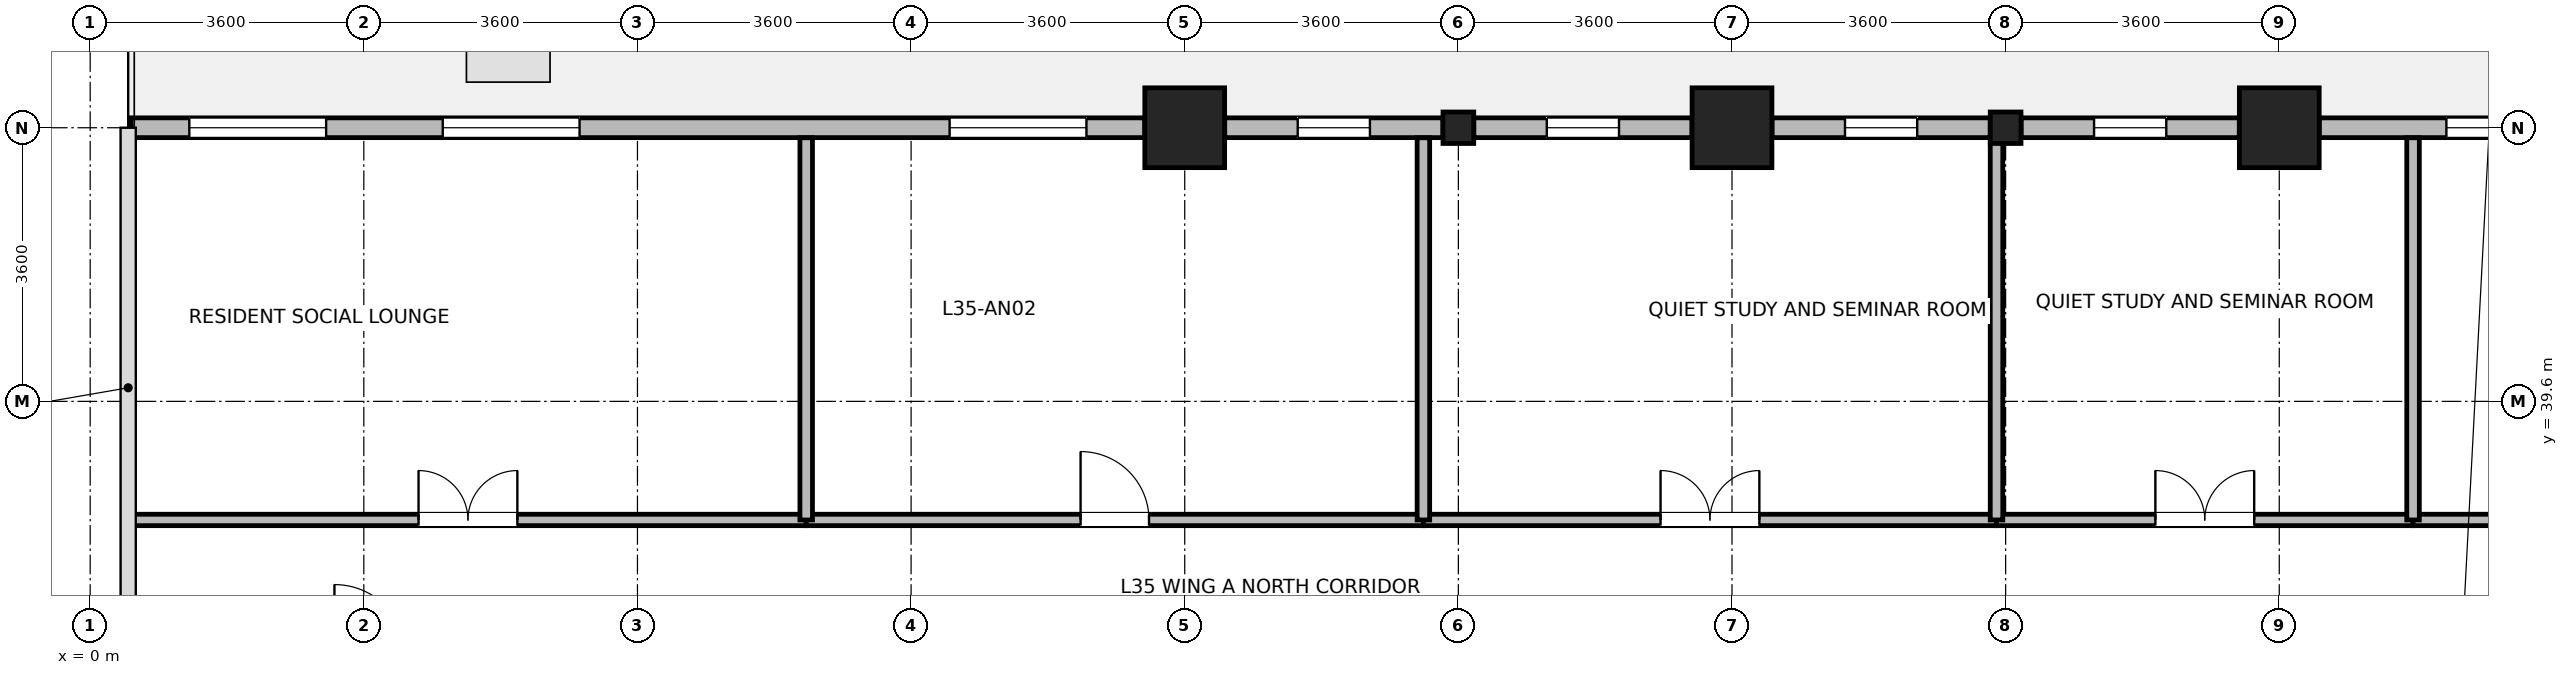
"""IFC4 building model, lengths in metres.
Left out: names, types, materials, properties, quantities, classifications, styles, units other than length and angle.
Written with IfcOpenShell. Run it as: python <this file> out.ifc"""

import sys

from ifc_helpers import new_model, si_unit, direction, frame, frame_2d, origin, origin_2d, place, context, subcontext, project, spatial, rectangle, i_section, extrude, source, transform, mapped, element, fill, save


model = new_model("IFC4")
c1 = context("Model", 3, precision=1e-05, world=origin(), true_north=direction((0.0, 1.0)))
c2 = subcontext(c1, "Body", "Model", "MODEL_VIEW")
j1 = project(units=[si_unit("LENGTHUNIT", "METRE"), si_unit("PLANEANGLEUNIT", "RADIAN")], contexts=[c1])
p1 = place(None, origin())
s1 = spatial("IfcSite", under=j1, at=p1, CompositionType="ELEMENT")
p2 = place(p1, origin())
s2 = spatial("IfcBuilding", under=s1, at=p2, CompositionType="ELEMENT")
p3 = place(p2, frame((0.0, 0.0, 140.2)))
s3 = spatial("IfcBuildingStorey", under=s2, at=p3, CompositionType="ELEMENT", Elevation=140.2)
m1 = source(origin(), c2, "Body", "SweptSolid", [
    extrude(rectangle(XDim=1.05, YDim=1.05, at=origin_2d()), origin(), (0.0, 0.0, 1.0), 3.7),
])
for number, where, z_axis, x_axis in (
    (1, (14.4, 43.2, 0.0), (0.0, 0.0, 1.0), (1.0, 0.0, 0.0)),
    (2, (21.6, 43.2, 0.0), (0.0, 0.0, 1.0), (1.0, 0.0, 0.0)),
    (3, (28.8, 43.2, 0.0), (0.0, 0.0, 1.0), (1.0, 0.0, 0.0)),
):
    element("IfcColumn", number, at=place(p3, frame(where, z_axis=z_axis, x_axis=x_axis)), inside=s3, PredefinedType="COLUMN", context=c2, shape_type="MappedRepresentation", body=[
        mapped(m1, transform((0.0, 0.0, 0.0), x_axis=(1.0, 0.0, 0.0), y_axis=(0.0, 1.0, 0.0), z_axis=(0.0, 0.0, 1.0), scale=1.0)),
    ])
m2 = source(origin(), c2, "Body", "SweptSolid", [
    extrude(i_section(OverallWidth=0.404, OverallDepth=0.414, WebThickness=0.021, FlangeThickness=0.028, FilletRadius=0.015, at=origin_2d()), origin(), (0.0, 0.0, 1.0), 3.7),
])
for number, where, z_axis, x_axis in (
    (4, (18.0, 43.2, 0.0), (0.0, 0.0, 1.0), (1.0, 0.0, 0.0)),
    (5, (25.2, 43.2, 0.0), (0.0, 0.0, 1.0), (1.0, 0.0, 0.0)),
):
    element("IfcColumn", number, at=place(p3, frame(where, z_axis=z_axis, x_axis=x_axis)), inside=s3, PredefinedType="COLUMN", context=c2, shape_type="MappedRepresentation", body=[
        mapped(m2, transform((0.0, 0.0, 0.0), x_axis=(1.0, 0.0, 0.0), y_axis=(0.0, 1.0, 0.0), z_axis=(0.0, 0.0, 1.0), scale=1.0)),
    ])
p4 = place(p3, frame((29.326, 43.2, 0.0), z_axis=(0.0, 0.0, 1.0), x_axis=(1.0, 0.0, 0.0)))
e6 = element("IfcWall", 6, at=p4, inside=s3, PredefinedType="STANDARD", context=c2, shape_type="SweptSolid", body=[
    extrude(rectangle(XDim=2.871, YDim=0.26, at=frame_2d((1.436, 0.0))), origin(), (0.0, 0.0, 1.0), 2.99),
])
p5 = place(p4, frame((1.673, 0.0, 0.85)))
e7 = element("IfcOpeningElement", 7, at=p5, cuts=e6, PredefinedType="OPENING", context=c2, shape_type="SweptSolid", body=[
    extrude(rectangle(XDim=0.95, YDim=1.75, at=frame_2d((0.475, 0.875))), frame((0.0, 0.14, 0.0), z_axis=(0.0, -1.0, 0.0), x_axis=(1.0, 0.0, 0.0)), (0.0, 0.0, 1.0), 0.28),
])
p6 = place(p3, frame((25.403, 43.2, 0.0), z_axis=(0.0, 0.0, 1.0), x_axis=(1.0, 0.0, 0.0)))
e8 = element("IfcWall", 8, at=p6, inside=s3, PredefinedType="STANDARD", context=c2, shape_type="SweptSolid", body=[
    extrude(rectangle(XDim=2.871, YDim=0.26, at=frame_2d((1.436, 0.0))), origin(), (0.0, 0.0, 1.0), 2.99),
])
p7 = place(p6, frame((0.96, 0.0, 0.85)))
e9 = element("IfcOpeningElement", 9, at=p7, cuts=e8, PredefinedType="OPENING", context=c2, shape_type="SweptSolid", body=[
    extrude(rectangle(XDim=0.95, YDim=1.75, at=frame_2d((0.475, 0.875))), frame((0.0, 0.14, 0.0), z_axis=(0.0, -1.0, 0.0), x_axis=(1.0, 0.0, 0.0)), (0.0, 0.0, 1.0), 0.28),
])
p8 = place(p3, frame((22.126, 43.2, 0.0), z_axis=(0.0, 0.0, 1.0), x_axis=(1.0, 0.0, 0.0)))
e10 = element("IfcWall", 10, at=p8, inside=s3, PredefinedType="STANDARD", context=c2, shape_type="SweptSolid", body=[
    extrude(rectangle(XDim=2.871, YDim=0.26, at=frame_2d((1.436, 0.0))), origin(), (0.0, 0.0, 1.0), 2.99),
])
p9 = place(p8, frame((0.96, 0.0, 0.85)))
e11 = element("IfcOpeningElement", 11, at=p9, cuts=e10, PredefinedType="OPENING", context=c2, shape_type="SweptSolid", body=[
    extrude(rectangle(XDim=0.95, YDim=1.75, at=frame_2d((0.475, 0.875))), frame((0.0, 0.14, 0.0), z_axis=(0.0, -1.0, 0.0), x_axis=(1.0, 0.0, 0.0)), (0.0, 0.0, 1.0), 0.28),
])
p10 = place(p3, frame((18.203, 43.2, 0.0), z_axis=(0.0, 0.0, 1.0), x_axis=(1.0, 0.0, 0.0)))
e12 = element("IfcWall", 12, at=p10, inside=s3, PredefinedType="STANDARD", context=c2, shape_type="SweptSolid", body=[
    extrude(rectangle(XDim=2.871, YDim=0.26, at=frame_2d((1.436, 0.0))), origin(), (0.0, 0.0, 1.0), 2.99),
])
p11 = place(p10, frame((0.96, 0.0, 0.85)))
e13 = element("IfcOpeningElement", 13, at=p11, cuts=e12, PredefinedType="OPENING", context=c2, shape_type="SweptSolid", body=[
    extrude(rectangle(XDim=0.95, YDim=1.75, at=frame_2d((0.475, 0.875))), frame((0.0, 0.14, 0.0), z_axis=(0.0, -1.0, 0.0), x_axis=(1.0, 0.0, 0.0)), (0.0, 0.0, 1.0), 0.28),
])
p12 = place(p3, frame((14.926, 43.2, 0.0), z_axis=(0.0, 0.0, 1.0), x_axis=(1.0, 0.0, 0.0)))
e14 = element("IfcWall", 14, at=p12, inside=s3, PredefinedType="STANDARD", context=c2, shape_type="SweptSolid", body=[
    extrude(rectangle(XDim=2.871, YDim=0.26, at=frame_2d((1.436, 0.0))), origin(), (0.0, 0.0, 1.0), 2.99),
])
p13 = place(p12, frame((0.96, 0.0, 0.85)))
e15 = element("IfcOpeningElement", 15, at=p13, cuts=e14, PredefinedType="OPENING", context=c2, shape_type="SweptSolid", body=[
    extrude(rectangle(XDim=0.95, YDim=1.75, at=frame_2d((0.475, 0.875))), frame((0.0, 0.14, 0.0), z_axis=(0.0, -1.0, 0.0), x_axis=(1.0, 0.0, 0.0)), (0.0, 0.0, 1.0), 0.28),
])
p14 = place(p3, frame((0.537, 43.2, 0.0), z_axis=(0.0, 0.0, 1.0), x_axis=(1.0, 0.0, 0.0)))
e16 = element("IfcWall", 16, at=p14, inside=s3, PredefinedType="STANDARD", context=c2, shape_type="SweptSolid", body=[
    extrude(rectangle(XDim=13.337, YDim=0.26, at=frame_2d((6.668, 0.0))), origin(), (0.0, 0.0, 1.0), 3.44),
])
p15 = place(p14, frame((0.767, 0.0, 0.85)))
e17 = element("IfcOpeningElement", 17, at=p15, cuts=e16, PredefinedType="OPENING", context=c2, shape_type="SweptSolid", body=[
    extrude(rectangle(XDim=1.8, YDim=1.85, at=frame_2d((0.9, 0.925))), frame((0.0, 0.14, 0.0), z_axis=(0.0, -1.0, 0.0), x_axis=(1.0, 0.0, 0.0)), (0.0, 0.0, 1.0), 0.28),
])
p16 = place(p14, frame((4.101, 0.0, 0.85)))
e18 = element("IfcOpeningElement", 18, at=p16, cuts=e16, PredefinedType="OPENING", context=c2, shape_type="SweptSolid", body=[
    extrude(rectangle(XDim=1.8, YDim=1.85, at=frame_2d((0.9, 0.925))), frame((0.0, 0.14, 0.0), z_axis=(0.0, -1.0, 0.0), x_axis=(1.0, 0.0, 0.0)), (0.0, 0.0, 1.0), 0.28),
])
p17 = place(p14, frame((10.77, 0.0, 0.85)))
e19 = element("IfcOpeningElement", 19, at=p17, cuts=e16, PredefinedType="OPENING", context=c2, shape_type="SweptSolid", body=[
    extrude(rectangle(XDim=1.8, YDim=1.85, at=frame_2d((0.9, 0.925))), frame((0.0, 0.14, 0.0), z_axis=(0.0, -1.0, 0.0), x_axis=(1.0, 0.0, 0.0)), (0.0, 0.0, 1.0), 0.28),
])
p18 = place(p3, frame((0.52, 38.04, 0.0), z_axis=(0.0, 0.0, 1.0), x_axis=(1.0, 0.0, 0.0)))
e20 = element("IfcWall", 20, at=p18, inside=s3, PredefinedType="PARTITIONING", context=c2, shape_type="SweptSolid", body=[
    extrude(rectangle(XDim=8.9, YDim=0.15, at=frame_2d((4.45, 0.0))), origin(), (0.0, 0.0, 1.0), 3.44),
])
p19 = place(p18, frame((3.8, 0.0, 0.0)))
e21 = element("IfcOpeningElement", 21, at=p19, cuts=e20, PredefinedType="OPENING", context=c2, shape_type="SweptSolid", body=[
    extrude(rectangle(XDim=1.3, YDim=2.12, at=frame_2d((0.65, 1.06))), frame((0.0, 0.085, 0.0), z_axis=(0.0, -1.0, 0.0), x_axis=(1.0, 0.0, 0.0)), (0.0, 0.0, 1.0), 0.17),
])
p20 = place(p3, frame((9.42, 38.04, 0.0), z_axis=(0.0, 0.0, 1.0), x_axis=(1.0, 0.0, 0.0)))
e22 = element("IfcWall", 22, at=p20, inside=s3, PredefinedType="PARTITIONING", context=c2, shape_type="SweptSolid", body=[
    extrude(rectangle(XDim=8.12, YDim=0.15, at=frame_2d((4.06, 0.0))), origin(), (0.0, 0.0, 1.0), 3.44),
])
p21 = place(p20, frame((3.61, 0.0, 0.0)))
e23 = element("IfcOpeningElement", 23, at=p21, cuts=e22, PredefinedType="OPENING", context=c2, shape_type="SweptSolid", body=[
    extrude(rectangle(XDim=0.9, YDim=2.08, at=frame_2d((0.45, 1.04))), frame((0.0, 0.085, 0.0), z_axis=(0.0, -1.0, 0.0), x_axis=(1.0, 0.0, 0.0)), (0.0, 0.0, 1.0), 0.17),
])
p22 = place(p3, frame((17.54, 38.04, 0.0), z_axis=(0.0, 0.0, 1.0), x_axis=(1.0, 0.0, 0.0)))
e24 = element("IfcWall", 24, at=p22, inside=s3, PredefinedType="PARTITIONING", context=c2, shape_type="SweptSolid", body=[
    extrude(rectangle(XDim=7.54, YDim=0.15, at=frame_2d((3.77, 0.0))), origin(), (0.0, 0.0, 1.0), 3.44),
])
p23 = place(p22, frame((3.12, 0.0, 0.0)))
e25 = element("IfcOpeningElement", 25, at=p23, cuts=e24, PredefinedType="OPENING", context=c2, shape_type="SweptSolid", body=[
    extrude(rectangle(XDim=1.3, YDim=2.12, at=frame_2d((0.65, 1.06))), frame((0.0, 0.085, 0.0), z_axis=(0.0, -1.0, 0.0), x_axis=(1.0, 0.0, 0.0)), (0.0, 0.0, 1.0), 0.17),
])
p24 = place(p3, frame((25.08, 38.04, 0.0), z_axis=(0.0, 0.0, 1.0), x_axis=(1.0, 0.0, 0.0)))
e26 = element("IfcWall", 26, at=p24, inside=s3, PredefinedType="PARTITIONING", context=c2, shape_type="SweptSolid", body=[
    extrude(rectangle(XDim=5.48, YDim=0.15, at=frame_2d((2.74, 0.0))), origin(), (0.0, 0.0, 1.0), 3.44),
])
p25 = place(p24, frame((2.09, 0.0, 0.0)))
e27 = element("IfcOpeningElement", 27, at=p25, cuts=e26, PredefinedType="OPENING", context=c2, shape_type="SweptSolid", body=[
    extrude(rectangle(XDim=1.3, YDim=2.12, at=frame_2d((0.65, 1.06))), frame((0.0, 0.085, 0.0), z_axis=(0.0, -1.0, 0.0), x_axis=(1.0, 0.0, 0.0)), (0.0, 0.0, 1.0), 0.17),
])
p26 = place(p3, frame((30.56, 38.04, 0.0), z_axis=(0.0, 0.0, 1.0), x_axis=(1.0, 0.0, 0.0)))
e28 = element("IfcWall", 28, at=p26, inside=s3, PredefinedType="PARTITIONING", context=c2, shape_type="SweptSolid", body=[
    extrude(rectangle(XDim=4.8, YDim=0.15, at=frame_2d((2.4, 0.0))), origin(), (0.0, 0.0, 1.0), 3.44),
])
p27 = place(p26, frame((1.75, 0.0, 0.0)))
e29 = element("IfcOpeningElement", 29, at=p27, cuts=e28, PredefinedType="OPENING", context=c2, shape_type="SweptSolid", body=[
    extrude(rectangle(XDim=1.3, YDim=2.12, at=frame_2d((0.65, 1.06))), frame((0.0, 0.085, 0.0), z_axis=(0.0, -1.0, 0.0), x_axis=(1.0, 0.0, 0.0)), (0.0, 0.0, 1.0), 0.17),
])
for number, where, z_axis, x_axis in (
    (30, (9.42, 38.04, 0.0), (0.0, 0.0, 1.0), (0.0, 1.0, 0.0)),
    (31, (17.54, 38.04, 0.0), (0.0, 0.0, 1.0), (0.0, 1.0, 0.0)),
):
    element("IfcWall", number, at=place(p3, frame(where, z_axis=z_axis, x_axis=x_axis)), inside=s3, PredefinedType="PARTITIONING", context=c2, shape_type="SweptSolid", body=[
        extrude(rectangle(XDim=5.028, YDim=0.165, at=frame_2d((2.514, 0.0))), origin(), (0.0, 0.0, 1.0), 3.44),
    ])
p28 = place(p3, frame((25.08, 38.04, 0.0), z_axis=(0.0, 0.0, 1.0), x_axis=(0.0, 1.0, 0.0)))
e32 = element("IfcWall", 32, at=p28, inside=s3, PredefinedType="PARTITIONING", context=c2, shape_type="SweptSolid", body=[
    extrude(rectangle(XDim=5.028, YDim=0.165, at=frame_2d((2.514, 0.0))), origin(), (0.0, 0.0, 1.0), 3.11),
])
p29 = place(p3, frame((30.56, 38.04, 0.0), z_axis=(0.0, 0.0, 1.0), x_axis=(0.0, 1.0, 0.0)))
e33 = element("IfcWall", 33, at=p29, inside=s3, PredefinedType="PARTITIONING", context=c2, shape_type="SweptSolid", body=[
    extrude(rectangle(XDim=5.028, YDim=0.165, at=frame_2d((2.514, 0.0))), origin(), (0.0, 0.0, 1.0), 3.44),
])
p30 = place(p5, origin())
e34 = element("IfcWindow", 34, at=p30, inside=s3, PartitioningType="SINGLE_PANEL", PredefinedType="WINDOW", context=c2, shape_type="SweptSolid", body=[
    extrude(rectangle(XDim=0.95, YDim=1.75, at=frame_2d((0.475, 0.875))), frame((0.0, 0.03, 0.0), z_axis=(0.0, -1.0, 0.0), x_axis=(1.0, 0.0, 0.0)), (0.0, 0.0, 1.0), 0.06),
])
fill(e7, e34)
p31 = place(p7, origin())
e35 = element("IfcWindow", 35, at=p31, inside=s3, PartitioningType="SINGLE_PANEL", PredefinedType="WINDOW", context=c2, shape_type="SweptSolid", body=[
    extrude(rectangle(XDim=0.95, YDim=1.75, at=frame_2d((0.475, 0.875))), frame((0.0, 0.03, 0.0), z_axis=(0.0, -1.0, 0.0), x_axis=(1.0, 0.0, 0.0)), (0.0, 0.0, 1.0), 0.06),
])
fill(e9, e35)
p32 = place(p9, origin())
e36 = element("IfcWindow", 36, at=p32, inside=s3, PartitioningType="SINGLE_PANEL", PredefinedType="WINDOW", context=c2, shape_type="SweptSolid", body=[
    extrude(rectangle(XDim=0.95, YDim=1.75, at=frame_2d((0.475, 0.875))), frame((0.0, 0.03, 0.0), z_axis=(0.0, -1.0, 0.0), x_axis=(1.0, 0.0, 0.0)), (0.0, 0.0, 1.0), 0.06),
])
fill(e11, e36)
p33 = place(p11, origin())
e37 = element("IfcWindow", 37, at=p33, inside=s3, PartitioningType="SINGLE_PANEL", PredefinedType="WINDOW", context=c2, shape_type="SweptSolid", body=[
    extrude(rectangle(XDim=0.95, YDim=1.75, at=frame_2d((0.475, 0.875))), frame((0.0, 0.03, 0.0), z_axis=(0.0, -1.0, 0.0), x_axis=(1.0, 0.0, 0.0)), (0.0, 0.0, 1.0), 0.06),
])
fill(e13, e37)
p34 = place(p13, origin())
e38 = element("IfcWindow", 38, at=p34, inside=s3, PartitioningType="SINGLE_PANEL", PredefinedType="WINDOW", context=c2, shape_type="SweptSolid", body=[
    extrude(rectangle(XDim=0.95, YDim=1.75, at=frame_2d((0.475, 0.875))), frame((0.0, 0.03, 0.0), z_axis=(0.0, -1.0, 0.0), x_axis=(1.0, 0.0, 0.0)), (0.0, 0.0, 1.0), 0.06),
])
fill(e15, e38)
p35 = place(p15, origin())
e39 = element("IfcWindow", 39, at=p35, inside=s3, PartitioningType="SINGLE_PANEL", PredefinedType="WINDOW", context=c2, shape_type="SweptSolid", body=[
    extrude(rectangle(XDim=1.8, YDim=1.85, at=frame_2d((0.9, 0.925))), frame((0.0, 0.03, 0.0), z_axis=(0.0, -1.0, 0.0), x_axis=(1.0, 0.0, 0.0)), (0.0, 0.0, 1.0), 0.06),
])
fill(e17, e39)
p36 = place(p16, origin())
e40 = element("IfcWindow", 40, at=p36, inside=s3, PartitioningType="SINGLE_PANEL", PredefinedType="WINDOW", context=c2, shape_type="SweptSolid", body=[
    extrude(rectangle(XDim=1.8, YDim=1.85, at=frame_2d((0.9, 0.925))), frame((0.0, 0.03, 0.0), z_axis=(0.0, -1.0, 0.0), x_axis=(1.0, 0.0, 0.0)), (0.0, 0.0, 1.0), 0.06),
])
fill(e18, e40)
p37 = place(p17, origin())
e41 = element("IfcWindow", 41, at=p37, inside=s3, PartitioningType="SINGLE_PANEL", PredefinedType="WINDOW", context=c2, shape_type="SweptSolid", body=[
    extrude(rectangle(XDim=1.8, YDim=1.85, at=frame_2d((0.9, 0.925))), frame((0.0, 0.03, 0.0), z_axis=(0.0, -1.0, 0.0), x_axis=(1.0, 0.0, 0.0)), (0.0, 0.0, 1.0), 0.06),
])
fill(e19, e41)
p38 = place(p19, origin())
e42 = element("IfcDoor", 42, at=p38, inside=s3, OperationType="DOUBLE_DOOR_SINGLE_SWING", PredefinedType="DOOR", context=c2, shape_type="SweptSolid", body=[
    extrude(rectangle(XDim=1.3, YDim=2.12, at=frame_2d((0.65, 1.06))), frame((0.0, 0.025, 0.0), z_axis=(0.0, -1.0, 0.0), x_axis=(1.0, 0.0, 0.0)), (0.0, 0.0, 1.0), 0.05),
])
fill(e21, e42)
p39 = place(p21, origin())
e43 = element("IfcDoor", 43, at=p39, inside=s3, OperationType="SINGLE_SWING_LEFT", PredefinedType="DOOR", context=c2, shape_type="SweptSolid", body=[
    extrude(rectangle(XDim=0.9, YDim=2.08, at=frame_2d((0.45, 1.04))), frame((0.0, 0.025, 0.0), z_axis=(0.0, -1.0, 0.0), x_axis=(1.0, 0.0, 0.0)), (0.0, 0.0, 1.0), 0.05),
])
fill(e23, e43)
p40 = place(p23, origin())
e44 = element("IfcDoor", 44, at=p40, inside=s3, OperationType="DOUBLE_DOOR_SINGLE_SWING", PredefinedType="DOOR", context=c2, shape_type="SweptSolid", body=[
    extrude(rectangle(XDim=1.3, YDim=2.12, at=frame_2d((0.65, 1.06))), frame((0.0, 0.025, 0.0), z_axis=(0.0, -1.0, 0.0), x_axis=(1.0, 0.0, 0.0)), (0.0, 0.0, 1.0), 0.05),
])
fill(e25, e44)
p41 = place(p25, origin())
e45 = element("IfcDoor", 45, at=p41, inside=s3, OperationType="DOUBLE_DOOR_SINGLE_SWING", PredefinedType="DOOR", context=c2, shape_type="SweptSolid", body=[
    extrude(rectangle(XDim=1.3, YDim=2.12, at=frame_2d((0.65, 1.06))), frame((0.0, 0.025, 0.0), z_axis=(0.0, -1.0, 0.0), x_axis=(1.0, 0.0, 0.0)), (0.0, 0.0, 1.0), 0.05),
])
fill(e27, e45)
save(model, sys.argv[1])
